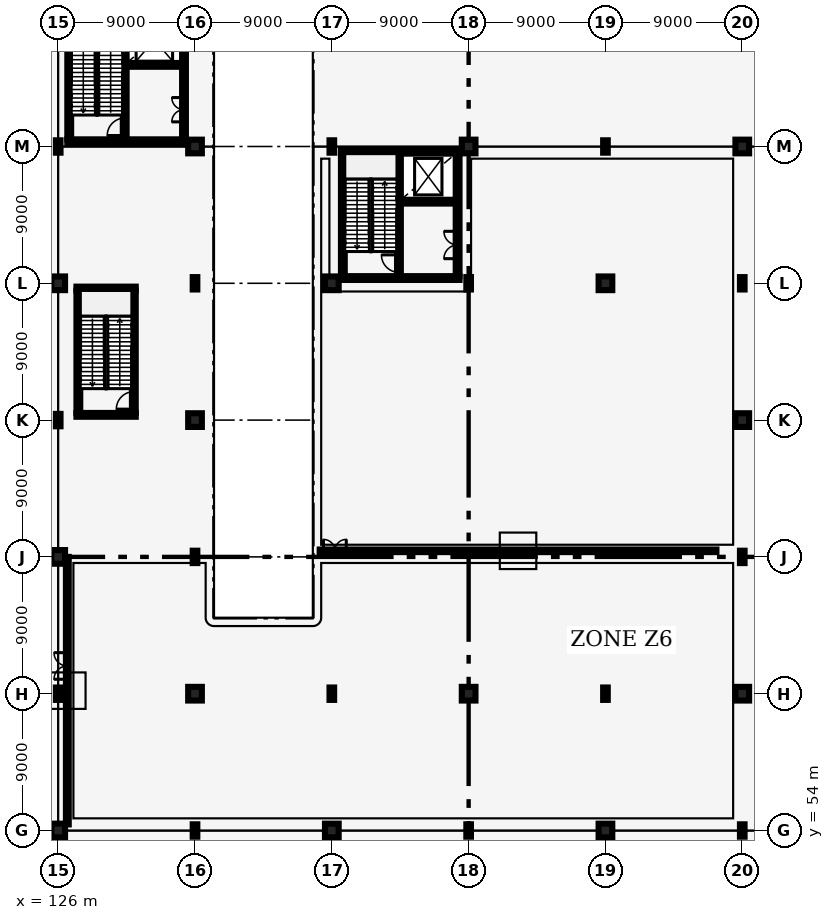
"""IFC4 building model, lengths in metres.
Left out: names, types, materials, properties, quantities, classifications, styles, units other than length and angle.
Written with IfcOpenShell. Run it as: python <this file> out.ifc"""

import sys

from ifc_helpers import new_model, si_unit, direction, frame, frame_2d, origin, origin_2d, place, context, subcontext, project, spatial, rectangle, i_section, extrude, element, fill, save


model = new_model("IFC4")
c1 = context("Model", 3, precision=1e-05, world=origin(), true_north=direction((0.0, 1.0)))
c2 = subcontext(c1, "Body", "Model", "MODEL_VIEW")
j1 = project(units=[si_unit("LENGTHUNIT", "METRE"), si_unit("PLANEANGLEUNIT", "RADIAN")], contexts=[c1])
p1 = place(None, origin())
s1 = spatial("IfcSite", under=j1, at=p1, CompositionType="ELEMENT")
p2 = place(p1, origin())
s2 = spatial("IfcBuilding", under=s1, at=p2, CompositionType="ELEMENT")
p3 = place(p2, origin())
s3 = spatial("IfcBuildingStorey", under=s2, at=p3, CompositionType="ELEMENT", Elevation=0.0)
p4 = place(p3, frame((126.0, 54.0, 0.0), z_axis=(0.0, 0.0, 1.0), x_axis=(1.0, 0.0, 0.0)))
e1 = element("IfcColumn", 1, at=p4, inside=s3, PredefinedType="COLUMN", context=c2, shape_type="SweptSolid", body=[
    extrude(rectangle(XDim=0.9, YDim=0.9, at=origin_2d()), origin(), (0.0, 0.0, 1.0), 6.0),
])
p5 = place(p3, frame((126.0, 63.0, 0.0), z_axis=(0.0, 0.0, 1.0), x_axis=(1.0, 0.0, 0.0)))
e2 = element("IfcColumn", 2, at=p5, inside=s3, PredefinedType="COLUMN", context=c2, shape_type="SweptSolid", body=[
    extrude(i_section(OverallWidth=0.303, OverallDepth=0.814, WebThickness=0.021, FlangeThickness=0.04, FilletRadius=0.03, at=origin_2d()), origin(), (0.0, 0.0, 1.0), 6.0),
])
p6 = place(p3, frame((126.0, 72.0, 0.0), z_axis=(0.0, 0.0, 1.0), x_axis=(1.0, 0.0, 0.0)))
e3 = element("IfcColumn", 3, at=p6, inside=s3, PredefinedType="COLUMN", context=c2, shape_type="SweptSolid", body=[
    extrude(rectangle(XDim=0.9, YDim=0.9, at=origin_2d()), origin(), (0.0, 0.0, 1.0), 6.0),
])
p7 = place(p3, frame((126.0, 81.0, 0.0), z_axis=(0.0, 0.0, 1.0), x_axis=(1.0, 0.0, 0.0)))
e4 = element("IfcColumn", 4, at=p7, inside=s3, PredefinedType="COLUMN", context=c2, shape_type="SweptSolid", body=[
    extrude(i_section(OverallWidth=0.303, OverallDepth=0.814, WebThickness=0.021, FlangeThickness=0.04, FilletRadius=0.03, at=origin_2d()), origin(), (0.0, 0.0, 1.0), 6.0),
])
p8 = place(p3, frame((126.0, 90.0, 0.0), z_axis=(0.0, 0.0, 1.0), x_axis=(1.0, 0.0, 0.0)))
e5 = element("IfcColumn", 5, at=p8, inside=s3, PredefinedType="COLUMN", context=c2, shape_type="SweptSolid", body=[
    extrude(rectangle(XDim=0.9, YDim=0.9, at=origin_2d()), origin(), (0.0, 0.0, 1.0), 6.0),
])
for number, where, z_axis, x_axis in (
    (6, (126.0, 99.0, 0.0), (0.0, 0.0, 1.0), (1.0, 0.0, 0.0)),
    (7, (135.0, 54.0, 0.0), (0.0, 0.0, 1.0), (1.0, 0.0, 0.0)),
):
    element("IfcColumn", number, at=place(p3, frame(where, z_axis=z_axis, x_axis=x_axis)), inside=s3, PredefinedType="COLUMN", context=c2, shape_type="SweptSolid", body=[
        extrude(i_section(OverallWidth=0.303, OverallDepth=0.814, WebThickness=0.021, FlangeThickness=0.04, FilletRadius=0.03, at=origin_2d()), origin(), (0.0, 0.0, 1.0), 6.0),
    ])
p9 = place(p3, frame((135.0, 63.0, 0.0), z_axis=(0.0, 0.0, 1.0), x_axis=(1.0, 0.0, 0.0)))
e8 = element("IfcColumn", 8, at=p9, inside=s3, PredefinedType="COLUMN", context=c2, shape_type="SweptSolid", body=[
    extrude(rectangle(XDim=0.9, YDim=0.9, at=origin_2d()), origin(), (0.0, 0.0, 1.0), 6.0),
])
p10 = place(p3, frame((135.0, 72.0, 0.0), z_axis=(0.0, 0.0, 1.0), x_axis=(1.0, 0.0, 0.0)))
e9 = element("IfcColumn", 9, at=p10, inside=s3, PredefinedType="COLUMN", context=c2, shape_type="SweptSolid", body=[
    extrude(i_section(OverallWidth=0.303, OverallDepth=0.814, WebThickness=0.021, FlangeThickness=0.04, FilletRadius=0.03, at=origin_2d()), origin(), (0.0, 0.0, 1.0), 6.0),
])
p11 = place(p3, frame((135.0, 81.0, 0.0), z_axis=(0.0, 0.0, 1.0), x_axis=(1.0, 0.0, 0.0)))
e10 = element("IfcColumn", 10, at=p11, inside=s3, PredefinedType="COLUMN", context=c2, shape_type="SweptSolid", body=[
    extrude(rectangle(XDim=0.9, YDim=0.9, at=origin_2d()), origin(), (0.0, 0.0, 1.0), 6.0),
])
p12 = place(p3, frame((135.0, 90.0, 0.0), z_axis=(0.0, 0.0, 1.0), x_axis=(1.0, 0.0, 0.0)))
e11 = element("IfcColumn", 11, at=p12, inside=s3, PredefinedType="COLUMN", context=c2, shape_type="SweptSolid", body=[
    extrude(i_section(OverallWidth=0.303, OverallDepth=0.814, WebThickness=0.021, FlangeThickness=0.04, FilletRadius=0.03, at=origin_2d()), origin(), (0.0, 0.0, 1.0), 6.0),
])
for number, where, z_axis, x_axis in (
    (12, (135.0, 99.0, 0.0), (0.0, 0.0, 1.0), (1.0, 0.0, 0.0)),
    (13, (144.0, 54.0, 0.0), (0.0, 0.0, 1.0), (1.0, 0.0, 0.0)),
):
    element("IfcColumn", number, at=place(p3, frame(where, z_axis=z_axis, x_axis=x_axis)), inside=s3, PredefinedType="COLUMN", context=c2, shape_type="SweptSolid", body=[
        extrude(rectangle(XDim=0.9, YDim=0.9, at=origin_2d()), origin(), (0.0, 0.0, 1.0), 6.0),
    ])
p13 = place(p3, frame((144.0, 63.0, 0.0), z_axis=(0.0, 0.0, 1.0), x_axis=(1.0, 0.0, 0.0)))
e14 = element("IfcColumn", 14, at=p13, inside=s3, PredefinedType="COLUMN", context=c2, shape_type="SweptSolid", body=[
    extrude(i_section(OverallWidth=0.303, OverallDepth=0.814, WebThickness=0.021, FlangeThickness=0.04, FilletRadius=0.03, at=origin_2d()), origin(), (0.0, 0.0, 1.0), 6.0),
])
p14 = place(p3, frame((144.0, 90.0, 0.0), z_axis=(0.0, 0.0, 1.0), x_axis=(1.0, 0.0, 0.0)))
e15 = element("IfcColumn", 15, at=p14, inside=s3, PredefinedType="COLUMN", context=c2, shape_type="SweptSolid", body=[
    extrude(rectangle(XDim=0.9, YDim=0.9, at=origin_2d()), origin(), (0.0, 0.0, 1.0), 6.0),
])
for number, where, z_axis, x_axis in (
    (16, (144.0, 99.0, 0.0), (0.0, 0.0, 1.0), (1.0, 0.0, 0.0)),
    (17, (153.0, 54.0, 0.0), (0.0, 0.0, 1.0), (1.0, 0.0, 0.0)),
):
    element("IfcColumn", number, at=place(p3, frame(where, z_axis=z_axis, x_axis=x_axis)), inside=s3, PredefinedType="COLUMN", context=c2, shape_type="SweptSolid", body=[
        extrude(i_section(OverallWidth=0.303, OverallDepth=0.814, WebThickness=0.021, FlangeThickness=0.04, FilletRadius=0.03, at=origin_2d()), origin(), (0.0, 0.0, 1.0), 6.0),
    ])
p15 = place(p3, frame((153.0, 63.0, 0.0), z_axis=(0.0, 0.0, 1.0), x_axis=(1.0, 0.0, 0.0)))
e18 = element("IfcColumn", 18, at=p15, inside=s3, PredefinedType="COLUMN", context=c2, shape_type="SweptSolid", body=[
    extrude(rectangle(XDim=0.9, YDim=0.9, at=origin_2d()), origin(), (0.0, 0.0, 1.0), 6.0),
])
p16 = place(p3, frame((153.0, 90.0, 0.0), z_axis=(0.0, 0.0, 1.0), x_axis=(1.0, 0.0, 0.0)))
e19 = element("IfcColumn", 19, at=p16, inside=s3, PredefinedType="COLUMN", context=c2, shape_type="SweptSolid", body=[
    extrude(i_section(OverallWidth=0.303, OverallDepth=0.814, WebThickness=0.021, FlangeThickness=0.04, FilletRadius=0.03, at=origin_2d()), origin(), (0.0, 0.0, 1.0), 6.0),
])
for number, where, z_axis, x_axis in (
    (20, (153.0, 99.0, 0.0), (0.0, 0.0, 1.0), (1.0, 0.0, 0.0)),
    (21, (162.0, 54.0, 0.0), (0.0, 0.0, 1.0), (1.0, 0.0, 0.0)),
):
    element("IfcColumn", number, at=place(p3, frame(where, z_axis=z_axis, x_axis=x_axis)), inside=s3, PredefinedType="COLUMN", context=c2, shape_type="SweptSolid", body=[
        extrude(rectangle(XDim=0.9, YDim=0.9, at=origin_2d()), origin(), (0.0, 0.0, 1.0), 6.0),
    ])
p17 = place(p3, frame((162.0, 63.0, 0.0), z_axis=(0.0, 0.0, 1.0), x_axis=(1.0, 0.0, 0.0)))
e22 = element("IfcColumn", 22, at=p17, inside=s3, PredefinedType="COLUMN", context=c2, shape_type="SweptSolid", body=[
    extrude(i_section(OverallWidth=0.303, OverallDepth=0.814, WebThickness=0.021, FlangeThickness=0.04, FilletRadius=0.03, at=origin_2d()), origin(), (0.0, 0.0, 1.0), 6.0),
])
p18 = place(p3, frame((162.0, 90.0, 0.0), z_axis=(0.0, 0.0, 1.0), x_axis=(1.0, 0.0, 0.0)))
e23 = element("IfcColumn", 23, at=p18, inside=s3, PredefinedType="COLUMN", context=c2, shape_type="SweptSolid", body=[
    extrude(rectangle(XDim=0.9, YDim=0.9, at=origin_2d()), origin(), (0.0, 0.0, 1.0), 6.0),
])
for number, where, z_axis, x_axis in (
    (24, (162.0, 99.0, 0.0), (0.0, 0.0, 1.0), (1.0, 0.0, 0.0)),
    (25, (171.0, 54.0, 0.0), (0.0, 0.0, 1.0), (1.0, 0.0, 0.0)),
):
    element("IfcColumn", number, at=place(p3, frame(where, z_axis=z_axis, x_axis=x_axis)), inside=s3, PredefinedType="COLUMN", context=c2, shape_type="SweptSolid", body=[
        extrude(i_section(OverallWidth=0.303, OverallDepth=0.814, WebThickness=0.021, FlangeThickness=0.04, FilletRadius=0.03, at=origin_2d()), origin(), (0.0, 0.0, 1.0), 6.0),
    ])
p19 = place(p3, frame((171.0, 63.0, 0.0), z_axis=(0.0, 0.0, 1.0), x_axis=(1.0, 0.0, 0.0)))
e26 = element("IfcColumn", 26, at=p19, inside=s3, PredefinedType="COLUMN", context=c2, shape_type="SweptSolid", body=[
    extrude(rectangle(XDim=0.9, YDim=0.9, at=origin_2d()), origin(), (0.0, 0.0, 1.0), 6.0),
])
p20 = place(p3, frame((171.0, 72.0, 0.0), z_axis=(0.0, 0.0, 1.0), x_axis=(1.0, 0.0, 0.0)))
e27 = element("IfcColumn", 27, at=p20, inside=s3, PredefinedType="COLUMN", context=c2, shape_type="SweptSolid", body=[
    extrude(i_section(OverallWidth=0.303, OverallDepth=0.814, WebThickness=0.021, FlangeThickness=0.04, FilletRadius=0.03, at=origin_2d()), origin(), (0.0, 0.0, 1.0), 6.0),
])
p21 = place(p3, frame((171.0, 81.0, 0.0), z_axis=(0.0, 0.0, 1.0), x_axis=(1.0, 0.0, 0.0)))
e28 = element("IfcColumn", 28, at=p21, inside=s3, PredefinedType="COLUMN", context=c2, shape_type="SweptSolid", body=[
    extrude(rectangle(XDim=0.9, YDim=0.9, at=origin_2d()), origin(), (0.0, 0.0, 1.0), 6.0),
])
p22 = place(p3, frame((171.0, 90.0, 0.0), z_axis=(0.0, 0.0, 1.0), x_axis=(1.0, 0.0, 0.0)))
e29 = element("IfcColumn", 29, at=p22, inside=s3, PredefinedType="COLUMN", context=c2, shape_type="SweptSolid", body=[
    extrude(i_section(OverallWidth=0.303, OverallDepth=0.814, WebThickness=0.021, FlangeThickness=0.04, FilletRadius=0.03, at=origin_2d()), origin(), (0.0, 0.0, 1.0), 6.0),
])
p23 = place(p3, frame((171.0, 99.0, 0.0), z_axis=(0.0, 0.0, 1.0), x_axis=(1.0, 0.0, 0.0)))
e30 = element("IfcColumn", 30, at=p23, inside=s3, PredefinedType="COLUMN", context=c2, shape_type="SweptSolid", body=[
    extrude(rectangle(XDim=0.9, YDim=0.9, at=origin_2d()), origin(), (0.0, 0.0, 1.0), 6.0),
])
p24 = place(p3, frame((144.725, 90.47, 0.0), z_axis=(0.0, 0.0, 1.0), x_axis=(0.0, 1.0, 0.0)))
e31 = element("IfcWall", 31, at=p24, inside=s3, PredefinedType="SHEAR", context=c2, shape_type="SweptSolid", body=[
    extrude(rectangle(XDim=8.06, YDim=0.25, at=frame_2d((4.03, 0.0))), origin(), (0.0, 0.0, 1.0), 5.64),
])
p25 = place(p3, frame((152.275, 90.47, 0.0), z_axis=(0.0, 0.0, 1.0), x_axis=(0.0, 1.0, 0.0)))
e32 = element("IfcWall", 32, at=p25, inside=s3, PredefinedType="SHEAR", context=c2, shape_type="SweptSolid", body=[
    extrude(rectangle(XDim=8.06, YDim=0.25, at=frame_2d((4.03, 0.0))), origin(), (0.0, 0.0, 1.0), 5.64),
])
p26 = place(p25, frame((1.15, 0.0, 0.0)))
e33 = element("IfcOpeningElement", 33, at=p26, cuts=e32, PredefinedType="OPENING", context=c2, shape_type="SweptSolid", body=[
    extrude(rectangle(XDim=1.8, YDim=2.2, at=frame_2d((0.9, 1.1))), frame((0.0, 0.135, 0.0), z_axis=(0.0, -1.0, 0.0), x_axis=(1.0, 0.0, 0.0)), (0.0, 0.0, 1.0), 0.27),
])
for number, where, z_axis, x_axis in (
    (34, (144.6, 90.345, 0.0), (0.0, 0.0, 1.0), (1.0, 0.0, 0.0)),
    (35, (144.6, 98.655, 0.0), (0.0, 0.0, 1.0), (1.0, 0.0, 0.0)),
):
    element("IfcWall", number, at=place(p3, frame(where, z_axis=z_axis, x_axis=x_axis)), inside=s3, PredefinedType="SHEAR", context=c2, shape_type="SweptSolid", body=[
        extrude(rectangle(XDim=7.8, YDim=0.25, at=frame_2d((3.9, 0.0))), origin(), (0.0, 0.0, 1.0), 5.64),
    ])
p27 = place(p3, frame((148.415, 90.47, 0.0), z_axis=(0.0, 0.0, 1.0), x_axis=(0.0, 1.0, 0.0)))
e36 = element("IfcWall", 36, at=p27, inside=s3, PredefinedType="SHEAR", context=c2, shape_type="SweptSolid", body=[
    extrude(rectangle(XDim=8.06, YDim=0.25, at=frame_2d((4.03, 0.0))), origin(), (0.0, 0.0, 1.0), 5.64),
])
p28 = place(p27, frame((0.25, 0.0, 0.0)))
e37 = element("IfcOpeningElement", 37, at=p28, cuts=e36, PredefinedType="OPENING", context=c2, shape_type="SweptSolid", body=[
    extrude(rectangle(XDim=1.15, YDim=2.15, at=frame_2d((0.575, 1.075))), frame((0.0, 0.135, 0.0), z_axis=(0.0, -1.0, 0.0), x_axis=(1.0, 0.0, 0.0)), (0.0, 0.0, 1.0), 0.27),
])
p29 = place(p3, frame((148.54, 95.37, 0.0), z_axis=(0.0, 0.0, 1.0), x_axis=(1.0, 0.0, 0.0)))
e38 = element("IfcWall", 38, at=p29, inside=s3, PredefinedType="SHEAR", context=c2, shape_type="SweptSolid", body=[
    extrude(rectangle(XDim=3.61, YDim=0.25, at=frame_2d((1.805, 0.0))), origin(), (0.0, 0.0, 1.0), 5.64),
])
p30 = place(p29, frame((0.95, 0.0, 0.0)))
e39 = element("IfcOpeningElement", 39, at=p30, cuts=e38, PredefinedType="OPENING", context=c2, shape_type="SweptSolid", body=[
    extrude(rectangle(XDim=1.2, YDim=2.2, at=frame_2d((0.6, 1.1))), frame((0.0, 0.135, 0.0), z_axis=(0.0, -1.0, 0.0), x_axis=(1.0, 0.0, 0.0)), (0.0, 0.0, 1.0), 0.27),
])
p31 = place(p3, frame((126.725, 99.47, 0.0), z_axis=(0.0, 0.0, 1.0), x_axis=(0.0, 1.0, 0.0)))
e40 = element("IfcWall", 40, at=p31, inside=s3, PredefinedType="SHEAR", context=c2, shape_type="SweptSolid", body=[
    extrude(rectangle(XDim=8.06, YDim=0.25, at=frame_2d((4.03, 0.0))), origin(), (0.0, 0.0, 1.0), 5.67),
])
p32 = place(p3, frame((134.275, 99.47, 0.0), z_axis=(0.0, 0.0, 1.0), x_axis=(0.0, 1.0, 0.0)))
e41 = element("IfcWall", 41, at=p32, inside=s3, PredefinedType="SHEAR", context=c2, shape_type="SweptSolid", body=[
    extrude(rectangle(XDim=8.06, YDim=0.25, at=frame_2d((4.03, 0.0))), origin(), (0.0, 0.0, 1.0), 5.67),
])
p33 = place(p32, frame((1.15, 0.0, 0.0)))
e42 = element("IfcOpeningElement", 42, at=p33, cuts=e41, PredefinedType="OPENING", context=c2, shape_type="SweptSolid", body=[
    extrude(rectangle(XDim=1.6, YDim=2.2, at=frame_2d((0.8, 1.1))), frame((0.0, 0.135, 0.0), z_axis=(0.0, -1.0, 0.0), x_axis=(1.0, 0.0, 0.0)), (0.0, 0.0, 1.0), 0.27),
])
p34 = place(p3, frame((126.6, 99.345, 0.0), z_axis=(0.0, 0.0, 1.0), x_axis=(1.0, 0.0, 0.0)))
e43 = element("IfcWall", 43, at=p34, inside=s3, PredefinedType="SHEAR", context=c2, shape_type="SweptSolid", body=[
    extrude(rectangle(XDim=7.8, YDim=0.25, at=frame_2d((3.9, 0.0))), origin(), (0.0, 0.0, 1.0), 5.67),
])
p35 = place(p3, frame((130.375, 99.47, 0.0), z_axis=(0.0, 0.0, 1.0), x_axis=(0.0, 1.0, 0.0)))
e44 = element("IfcWall", 44, at=p35, inside=s3, PredefinedType="SHEAR", context=c2, shape_type="SweptSolid", body=[
    extrude(rectangle(XDim=8.06, YDim=0.25, at=frame_2d((4.03, 0.0))), origin(), (0.0, 0.0, 1.0), 5.67),
])
p36 = place(p35, frame((0.25, 0.0, 0.0)))
e45 = element("IfcOpeningElement", 45, at=p36, cuts=e44, PredefinedType="OPENING", context=c2, shape_type="SweptSolid", body=[
    extrude(rectangle(XDim=1.15, YDim=2.15, at=frame_2d((0.575, 1.075))), frame((0.0, 0.135, 0.0), z_axis=(0.0, -1.0, 0.0), x_axis=(1.0, 0.0, 0.0)), (0.0, 0.0, 1.0), 0.27),
])
p37 = place(p3, frame((130.5, 104.37, 0.0), z_axis=(0.0, 0.0, 1.0), x_axis=(1.0, 0.0, 0.0)))
e46 = element("IfcWall", 46, at=p37, inside=s3, PredefinedType="SHEAR", context=c2, shape_type="SweptSolid", body=[
    extrude(rectangle(XDim=3.65, YDim=0.25, at=frame_2d((1.825, 0.0))), origin(), (0.0, 0.0, 1.0), 5.67),
])
p38 = place(p37, frame((0.5, 0.0, 0.0)))
e47 = element("IfcOpeningElement", 47, at=p38, cuts=e46, PredefinedType="OPENING", context=c2, shape_type="SweptSolid", body=[
    extrude(rectangle(XDim=2.2, YDim=2.4, at=frame_2d((1.1, 1.2))), frame((0.0, 0.135, 0.0), z_axis=(0.0, -1.0, 0.0), x_axis=(1.0, 0.0, 0.0)), (0.0, 0.0, 1.0), 0.27),
])
p39 = place(p3, frame((127.325, 81.47, 0.0), z_axis=(0.0, 0.0, 1.0), x_axis=(0.0, 1.0, 0.0)))
e48 = element("IfcWall", 48, at=p39, inside=s3, PredefinedType="SHEAR", context=c2, shape_type="SweptSolid", body=[
    extrude(rectangle(XDim=8.06, YDim=0.25, at=frame_2d((4.03, 0.0))), origin(), (0.0, 0.0, 1.0), 5.64),
])
p40 = place(p3, frame((130.975, 81.47, 0.0), z_axis=(0.0, 0.0, 1.0), x_axis=(0.0, 1.0, 0.0)))
e49 = element("IfcWall", 49, at=p40, inside=s3, PredefinedType="SHEAR", context=c2, shape_type="SweptSolid", body=[
    extrude(rectangle(XDim=8.06, YDim=0.25, at=frame_2d((4.03, 0.0))), origin(), (0.0, 0.0, 1.0), 5.64),
])
p41 = place(p40, frame((0.25, 0.0, 0.0)))
e50 = element("IfcOpeningElement", 50, at=p41, cuts=e49, PredefinedType="OPENING", context=c2, shape_type="SweptSolid", body=[
    extrude(rectangle(XDim=1.15, YDim=2.15, at=frame_2d((0.575, 1.075))), frame((0.0, 0.135, 0.0), z_axis=(0.0, -1.0, 0.0), x_axis=(1.0, 0.0, 0.0)), (0.0, 0.0, 1.0), 0.27),
])
for number, where, z_axis, x_axis in (
    (51, (127.2, 81.345, 0.0), (0.0, 0.0, 1.0), (1.0, 0.0, 0.0)),
    (52, (127.2, 89.655, 0.0), (0.0, 0.0, 1.0), (1.0, 0.0, 0.0)),
):
    element("IfcWall", number, at=place(p3, frame(where, z_axis=z_axis, x_axis=x_axis)), inside=s3, PredefinedType="SHEAR", context=c2, shape_type="SweptSolid", body=[
        extrude(rectangle(XDim=3.9, YDim=0.25, at=frame_2d((1.95, 0.0))), origin(), (0.0, 0.0, 1.0), 5.64),
    ])
p42 = place(p3, frame((126.6, 54.4, 0.0), z_axis=(0.0, 0.0, 1.0), x_axis=(0.0, 1.0, 0.0)))
e53 = element("IfcWall", 53, at=p42, inside=s3, PredefinedType="PARTITIONING", context=c2, shape_type="SweptSolid", body=[
    extrude(rectangle(XDim=17.6, YDim=0.185, at=frame_2d((8.8, 0.0))), origin(), (0.0, 0.0, 1.0), 4.85),
])
p43 = place(p42, frame((9.55, 0.0, 0.0)))
e54 = element("IfcOpeningElement", 54, at=p43, cuts=e53, PredefinedType="OPENING", context=c2, shape_type="SweptSolid", body=[
    extrude(rectangle(XDim=1.75, YDim=2.3, at=frame_2d((0.875, 1.15))), frame((0.0, 0.103, 0.0), z_axis=(0.0, -1.0, 0.0), x_axis=(1.0, 0.0, 0.0)), (0.0, 0.0, 1.0), 0.205),
])
p44 = place(p3, frame((143.2, 72.4, 0.0), z_axis=(0.0, 0.0, 1.0), x_axis=(1.0, 0.0, 0.0)))
e55 = element("IfcWall", 55, at=p44, inside=s3, PredefinedType="PARTITIONING", context=c2, shape_type="SweptSolid", body=[
    extrude(rectangle(XDim=26.1, YDim=0.17, at=frame_2d((13.05, 0.0))), origin(), (0.0, 0.0, 1.0), 4.85),
])
p45 = place(p44, frame((0.25, 0.0, 0.0)))
e56 = element("IfcOpeningElement", 56, at=p45, cuts=e55, PredefinedType="OPENING", context=c2, shape_type="SweptSolid", body=[
    extrude(rectangle(XDim=1.5, YDim=2.25, at=frame_2d((0.75, 1.125))), frame((0.0, 0.095, 0.0), z_axis=(0.0, -1.0, 0.0), x_axis=(1.0, 0.0, 0.0)), (0.0, 0.0, 1.0), 0.19),
])
p46 = place(p28, origin())
e57 = element("IfcDoor", 57, at=p46, inside=s3, OperationType="SINGLE_SWING_RIGHT", PredefinedType="DOOR", context=c2, shape_type="SweptSolid", body=[
    extrude(rectangle(XDim=1.15, YDim=2.15, at=frame_2d((0.575, 1.075))), frame((0.0, 0.025, 0.0), z_axis=(0.0, -1.0, 0.0), x_axis=(1.0, 0.0, 0.0)), (0.0, 0.0, 1.0), 0.05),
])
fill(e37, e57)
p47 = place(p30, origin())
e58 = element("IfcDoor", 58, at=p47, inside=s3, OperationType="DOUBLE_DOOR_SLIDING", PredefinedType="DOOR", context=c2, shape_type="SweptSolid", body=[
    extrude(rectangle(XDim=1.2, YDim=2.2, at=frame_2d((0.6, 1.1))), frame((0.0, 0.025, 0.0), z_axis=(0.0, -1.0, 0.0), x_axis=(1.0, 0.0, 0.0)), (0.0, 0.0, 1.0), 0.05),
])
fill(e39, e58)
p48 = place(p26, origin())
e59 = element("IfcDoor", 59, at=p48, inside=s3, OperationType="DOUBLE_DOOR_SINGLE_SWING", PredefinedType="DOOR", context=c2, shape_type="SweptSolid", body=[
    extrude(rectangle(XDim=1.8, YDim=2.2, at=frame_2d((0.9, 1.1))), frame((0.0, 0.025, 0.0), z_axis=(0.0, -1.0, 0.0), x_axis=(1.0, 0.0, 0.0)), (0.0, 0.0, 1.0), 0.05),
])
fill(e33, e59)
p49 = place(p36, origin())
e60 = element("IfcDoor", 60, at=p49, inside=s3, OperationType="SINGLE_SWING_LEFT", PredefinedType="DOOR", context=c2, shape_type="SweptSolid", body=[
    extrude(rectangle(XDim=1.15, YDim=2.15, at=frame_2d((0.575, 1.075))), frame((0.0, 0.025, 0.0), z_axis=(0.0, -1.0, 0.0), x_axis=(1.0, 0.0, 0.0)), (0.0, 0.0, 1.0), 0.05),
])
fill(e45, e60)
p50 = place(p38, origin())
e61 = element("IfcDoor", 61, at=p50, inside=s3, OperationType="DOUBLE_DOOR_SLIDING", PredefinedType="DOOR", context=c2, shape_type="SweptSolid", body=[
    extrude(rectangle(XDim=2.2, YDim=2.4, at=frame_2d((1.1, 1.2))), frame((0.0, 0.025, 0.0), z_axis=(0.0, -1.0, 0.0), x_axis=(1.0, 0.0, 0.0)), (0.0, 0.0, 1.0), 0.05),
])
fill(e47, e61)
p51 = place(p33, origin())
e62 = element("IfcDoor", 62, at=p51, inside=s3, OperationType="DOUBLE_DOOR_SINGLE_SWING", PredefinedType="DOOR", context=c2, shape_type="SweptSolid", body=[
    extrude(rectangle(XDim=1.6, YDim=2.2, at=frame_2d((0.8, 1.1))), frame((0.0, 0.025, 0.0), z_axis=(0.0, -1.0, 0.0), x_axis=(1.0, 0.0, 0.0)), (0.0, 0.0, 1.0), 0.05),
])
fill(e42, e62)
p52 = place(p41, origin())
e63 = element("IfcDoor", 63, at=p52, inside=s3, OperationType="SINGLE_SWING_LEFT", PredefinedType="DOOR", context=c2, shape_type="SweptSolid", body=[
    extrude(rectangle(XDim=1.15, YDim=2.15, at=frame_2d((0.575, 1.075))), frame((0.0, 0.025, 0.0), z_axis=(0.0, -1.0, 0.0), x_axis=(1.0, 0.0, 0.0)), (0.0, 0.0, 1.0), 0.05),
])
fill(e50, e63)
p53 = place(p43, origin())
e64 = element("IfcDoor", 64, at=p53, inside=s3, OperationType="DOUBLE_DOOR_SINGLE_SWING", PredefinedType="DOOR", context=c2, shape_type="SweptSolid", body=[
    extrude(rectangle(XDim=1.75, YDim=2.3, at=frame_2d((0.875, 1.15))), frame((0.0, 0.025, 0.0), z_axis=(0.0, -1.0, 0.0), x_axis=(1.0, 0.0, 0.0)), (0.0, 0.0, 1.0), 0.05),
])
fill(e54, e64)
p54 = place(p45, origin())
e65 = element("IfcDoor", 65, at=p54, inside=s3, OperationType="DOUBLE_DOOR_SINGLE_SWING", PredefinedType="DOOR", context=c2, shape_type="SweptSolid", body=[
    extrude(rectangle(XDim=1.5, YDim=2.25, at=frame_2d((0.75, 1.125))), frame((0.0, 0.025, 0.0), z_axis=(0.0, -1.0, 0.0), x_axis=(1.0, 0.0, 0.0)), (0.0, 0.0, 1.0), 0.05),
])
fill(e56, e65)
save(model, sys.argv[1])
